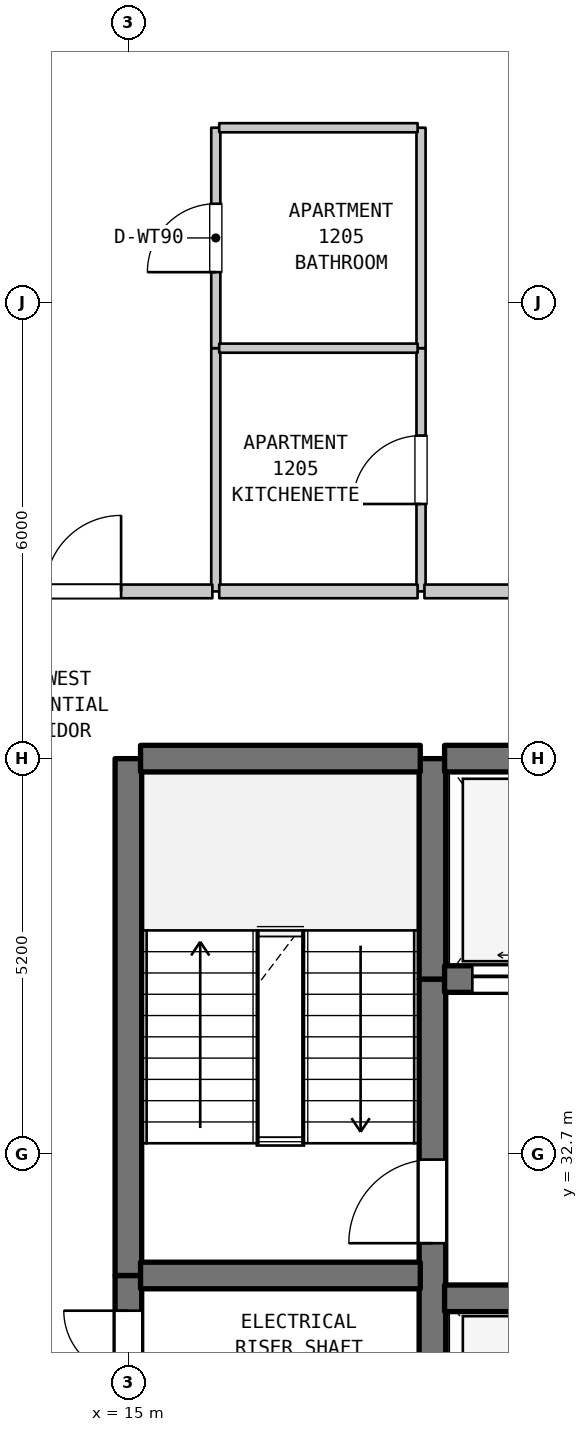
"""IFC4 building model, lengths in metres.
Left out: names, types, materials, properties, quantities, classifications, styles, units other than length and angle.
Written with IfcOpenShell. Run it as: python <this file> out.ifc"""

import sys

from ifc_helpers import new_model, si_unit, direction, frame, frame_2d, origin, place, context, subcontext, project, spatial, rectangle, extrude, element, fill, save


model = new_model("IFC4")
c1 = context("Model", 3, precision=1e-05, world=origin(), true_north=direction((0.0, 1.0)))
c2 = subcontext(c1, "Body", "Model", "MODEL_VIEW")
j1 = project(units=[si_unit("LENGTHUNIT", "METRE"), si_unit("PLANEANGLEUNIT", "RADIAN")], contexts=[c1])
p1 = place(None, origin())
s1 = spatial("IfcSite", under=j1, at=p1, CompositionType="ELEMENT")
p2 = place(p1, origin())
s2 = spatial("IfcBuilding", under=s1, at=p2, CompositionType="ELEMENT")
p3 = place(p2, frame((0.0, 0.0, 53.6)))
s3 = spatial("IfcBuildingStorey", under=s2, at=p3, CompositionType="ELEMENT", Elevation=53.6)
p4 = place(p3, frame((15.0, 29.5, 0.0), z_axis=(0.0, 0.0, 1.0), x_axis=(0.0, 1.0, 0.0)))
e1 = element("IfcWall", 1, at=p4, inside=s3, PredefinedType="SHEAR", context=c2, shape_type="SweptSolid", body=[
    extrude(rectangle(XDim=1.6, YDim=0.35, at=frame_2d((0.8, 0.0))), origin(), (0.0, 0.0, 1.0), 3.385),
])
p5 = place(p4, frame((0.287, 0.0, 0.0)))
e2 = element("IfcOpeningElement", 2, at=p5, cuts=e1, PredefinedType="OPENING", context=c2, shape_type="SweptSolid", body=[
    extrude(rectangle(XDim=0.85, YDim=2.1, at=frame_2d((0.425, 1.05))), frame((0.0, 0.185, 0.0), z_axis=(0.0, -1.0, 0.0), x_axis=(1.0, 0.0, 0.0)), (0.0, 0.0, 1.0), 0.37),
])
p6 = place(p3, frame((15.0, 31.1, 0.0), z_axis=(0.0, 0.0, 1.0), x_axis=(0.0, 1.0, 0.0)))
e3 = element("IfcWall", 3, at=p6, inside=s3, PredefinedType="SHEAR", context=c2, shape_type="SweptSolid", body=[
    extrude(rectangle(XDim=6.8, YDim=0.35, at=frame_2d((3.4, 0.0))), origin(), (0.0, 0.0, 1.0), 3.385),
])
p7 = place(p3, frame((16.15, 40.1, 0.0), z_axis=(0.0, 0.0, 1.0), x_axis=(0.0, 1.0, 0.0)))
e4 = element("IfcWall", 4, at=p7, inside=s3, PredefinedType="PARTITIONING", context=c2, shape_type="SweptSolid", body=[
    extrude(rectangle(XDim=3.2, YDim=0.12, at=frame_2d((1.6, 0.0))), origin(), (0.0, 0.0, 1.0), 3.385),
])
p8 = place(p3, frame((16.15, 43.3, 0.0), z_axis=(0.0, 0.0, 1.0), x_axis=(0.0, 1.0, 0.0)))
e5 = element("IfcWall", 5, at=p8, inside=s3, PredefinedType="PARTITIONING", context=c2, shape_type="SweptSolid", body=[
    extrude(rectangle(XDim=2.9, YDim=0.12, at=frame_2d((1.45, 0.0))), origin(), (0.0, 0.0, 1.0), 3.385),
])
p9 = place(p8, frame((1.0, 0.0, 0.0)))
e6 = element("IfcOpeningElement", 6, at=p9, cuts=e5, PredefinedType="OPENING", context=c2, shape_type="SweptSolid", body=[
    extrude(rectangle(XDim=0.9, YDim=2.1, at=frame_2d((0.45, 1.05))), frame((0.0, 0.07, 0.0), z_axis=(0.0, -1.0, 0.0), x_axis=(1.0, 0.0, 0.0)), (0.0, 0.0, 1.0), 0.14),
])
p10 = place(p3, frame((18.85, 40.1, 0.0), z_axis=(0.0, 0.0, 1.0), x_axis=(0.0, 1.0, 0.0)))
e7 = element("IfcWall", 7, at=p10, inside=s3, PredefinedType="PARTITIONING", context=c2, shape_type="SweptSolid", body=[
    extrude(rectangle(XDim=3.2, YDim=0.12, at=frame_2d((1.6, 0.0))), origin(), (0.0, 0.0, 1.0), 3.385),
])
p11 = place(p10, frame((1.15, 0.0, 0.0)))
e8 = element("IfcOpeningElement", 8, at=p11, cuts=e7, PredefinedType="OPENING", context=c2, shape_type="SweptSolid", body=[
    extrude(rectangle(XDim=0.9, YDim=2.15, at=frame_2d((0.45, 1.075))), frame((0.0, 0.07, 0.0), z_axis=(0.0, -1.0, 0.0), x_axis=(1.0, 0.0, 0.0)), (0.0, 0.0, 1.0), 0.14),
])
p12 = place(p3, frame((18.85, 43.3, 0.0), z_axis=(0.0, 0.0, 1.0), x_axis=(0.0, 1.0, 0.0)))
e9 = element("IfcWall", 9, at=p12, inside=s3, PredefinedType="PARTITIONING", context=c2, shape_type="SweptSolid", body=[
    extrude(rectangle(XDim=2.9, YDim=0.12, at=frame_2d((1.45, 0.0))), origin(), (0.0, 0.0, 1.0), 3.385),
])
p13 = place(p3, frame((19.0, 29.5, 0.0), z_axis=(0.0, 0.0, 1.0), x_axis=(0.0, 1.0, 0.0)))
e10 = element("IfcWall", 10, at=p13, inside=s3, PredefinedType="SHEAR", context=c2, shape_type="SweptSolid", body=[
    extrude(rectangle(XDim=5.5, YDim=0.35, at=frame_2d((2.75, 0.0))), origin(), (0.0, 0.0, 1.0), 3.385),
])
p14 = place(p13, frame((2.025, 0.0, 0.0)))
e11 = element("IfcOpeningElement", 11, at=p14, cuts=e10, PredefinedType="OPENING", context=c2, shape_type="SweptSolid", body=[
    extrude(rectangle(XDim=1.1, YDim=2.15, at=frame_2d((0.55, 1.075))), frame((0.0, 0.185, 0.0), z_axis=(0.0, -1.0, 0.0), x_axis=(1.0, 0.0, 0.0)), (0.0, 0.0, 1.0), 0.37),
])
p15 = place(p3, frame((19.0, 35.0, 0.0), z_axis=(0.0, 0.0, 1.0), x_axis=(0.0, 1.0, 0.0)))
e12 = element("IfcWall", 12, at=p15, inside=s3, PredefinedType="SHEAR", context=c2, shape_type="SweptSolid", body=[
    extrude(rectangle(XDim=2.9, YDim=0.35, at=frame_2d((1.45, 0.0))), origin(), (0.0, 0.0, 1.0), 3.385),
])
p16 = place(p3, frame((19.16, 30.8, 0.0), z_axis=(0.0, 0.0, 1.0), x_axis=(1.0, 0.0, 0.0)))
e13 = element("IfcWall", 13, at=p16, inside=s3, PredefinedType="SHEAR", context=c2, shape_type="SweptSolid", body=[
    extrude(rectangle(XDim=4.48, YDim=0.35, at=frame_2d((2.24, 0.0))), origin(), (0.0, 0.0, 1.0), 3.385),
])
p17 = place(p3, frame((15.16, 31.1, 0.0), z_axis=(0.0, 0.0, 1.0), x_axis=(1.0, 0.0, 0.0)))
e14 = element("IfcWall", 14, at=p17, inside=s3, PredefinedType="SHEAR", context=c2, shape_type="SweptSolid", body=[
    extrude(rectangle(XDim=3.68, YDim=0.35, at=frame_2d((1.84, 0.0))), origin(), (0.0, 0.0, 1.0), 3.385),
])
p18 = place(p3, frame((19.16, 35.0, 0.0), z_axis=(0.0, 0.0, 1.0), x_axis=(1.0, 0.0, 0.0)))
e15 = element("IfcWall", 15, at=p18, inside=s3, PredefinedType="SHEAR", context=c2, shape_type="SweptSolid", body=[
    extrude(rectangle(XDim=11.48, YDim=0.35, at=frame_2d((5.74, 0.0))), origin(), (0.0, 0.0, 1.0), 3.385),
])
p19 = place(p18, frame((0.365, 0.0, 0.0)))
e16 = element("IfcOpeningElement", 16, at=p19, cuts=e15, PredefinedType="OPENING", context=c2, shape_type="SweptSolid", body=[
    extrude(rectangle(XDim=1.35, YDim=2.2, at=frame_2d((0.675, 1.1))), frame((0.0, 0.185, 0.0), z_axis=(0.0, -1.0, 0.0), x_axis=(1.0, 0.0, 0.0)), (0.0, 0.0, 1.0), 0.37),
])
p20 = place(p18, frame((2.765, 0.0, 0.0)))
e17 = element("IfcOpeningElement", 17, at=p20, cuts=e15, PredefinedType="OPENING", context=c2, shape_type="SweptSolid", body=[
    extrude(rectangle(XDim=1.35, YDim=2.2, at=frame_2d((0.675, 1.1))), frame((0.0, 0.185, 0.0), z_axis=(0.0, -1.0, 0.0), x_axis=(1.0, 0.0, 0.0)), (0.0, 0.0, 1.0), 0.37),
])
p21 = place(p18, frame((4.915, 0.0, 0.0)))
e18 = element("IfcOpeningElement", 18, at=p21, cuts=e15, PredefinedType="OPENING", context=c2, shape_type="SweptSolid", body=[
    extrude(rectangle(XDim=1.2, YDim=2.2, at=frame_2d((0.6, 1.1))), frame((0.0, 0.185, 0.0), z_axis=(0.0, -1.0, 0.0), x_axis=(1.0, 0.0, 0.0)), (0.0, 0.0, 1.0), 0.37),
])
p22 = place(p18, frame((6.665, 0.0, 0.0)))
e19 = element("IfcOpeningElement", 19, at=p22, cuts=e15, PredefinedType="OPENING", context=c2, shape_type="SweptSolid", body=[
    extrude(rectangle(XDim=1.2, YDim=2.2, at=frame_2d((0.6, 1.1))), frame((0.0, 0.185, 0.0), z_axis=(0.0, -1.0, 0.0), x_axis=(1.0, 0.0, 0.0)), (0.0, 0.0, 1.0), 0.37),
])
p23 = place(p18, frame((8.415, 0.0, 0.0)))
e20 = element("IfcOpeningElement", 20, at=p23, cuts=e15, PredefinedType="OPENING", context=c2, shape_type="SweptSolid", body=[
    extrude(rectangle(XDim=1.2, YDim=2.2, at=frame_2d((0.6, 1.1))), frame((0.0, 0.185, 0.0), z_axis=(0.0, -1.0, 0.0), x_axis=(1.0, 0.0, 0.0)), (0.0, 0.0, 1.0), 0.37),
])
p24 = place(p18, frame((10.16, 0.0, 0.0)))
e21 = element("IfcOpeningElement", 21, at=p24, cuts=e15, PredefinedType="OPENING", context=c2, shape_type="SweptSolid", body=[
    extrude(rectangle(XDim=1.2, YDim=2.2, at=frame_2d((0.6, 1.1))), frame((0.0, 0.185, 0.0), z_axis=(0.0, -1.0, 0.0), x_axis=(1.0, 0.0, 0.0)), (0.0, 0.0, 1.0), 0.37),
])
p25 = place(p3, frame((15.16, 37.9, 0.0), z_axis=(0.0, 0.0, 1.0), x_axis=(1.0, 0.0, 0.0)))
e22 = element("IfcWall", 22, at=p25, inside=s3, PredefinedType="SHEAR", context=c2, shape_type="SweptSolid", body=[
    extrude(rectangle(XDim=3.68, YDim=0.35, at=frame_2d((1.84, 0.0))), origin(), (0.0, 0.0, 1.0), 3.385),
])
p26 = place(p3, frame((19.16, 37.9, 0.0), z_axis=(0.0, 0.0, 1.0), x_axis=(1.0, 0.0, 0.0)))
e23 = element("IfcWall", 23, at=p26, inside=s3, PredefinedType="SHEAR", context=c2, shape_type="SweptSolid", body=[
    extrude(rectangle(XDim=11.48, YDim=0.35, at=frame_2d((5.74, 0.0))), origin(), (0.0, 0.0, 1.0), 3.385),
])
p27 = place(p3, frame((12.875, 40.1, 0.0), z_axis=(0.0, 0.0, 1.0), x_axis=(1.0, 0.0, 0.0)))
e24 = element("IfcWall", 24, at=p27, inside=s3, PredefinedType="STANDARD", context=c2, shape_type="SweptSolid", body=[
    extrude(rectangle(XDim=3.23, YDim=0.18, at=frame_2d((1.615, 0.0))), origin(), (0.0, 0.0, 1.0), 3.385),
])
p28 = place(p27, frame((1.029, 0.0, 0.0)))
e25 = element("IfcOpeningElement", 25, at=p28, cuts=e24, PredefinedType="OPENING", context=c2, shape_type="SweptSolid", body=[
    extrude(rectangle(XDim=1.0, YDim=2.15, at=frame_2d((0.5, 1.075))), frame((0.0, 0.1, 0.0), z_axis=(0.0, -1.0, 0.0), x_axis=(1.0, 0.0, 0.0)), (0.0, 0.0, 1.0), 0.2),
])
p29 = place(p3, frame((16.195, 40.1, 0.0), z_axis=(0.0, 0.0, 1.0), x_axis=(1.0, 0.0, 0.0)))
e26 = element("IfcWall", 26, at=p29, inside=s3, PredefinedType="STANDARD", context=c2, shape_type="SweptSolid", body=[
    extrude(rectangle(XDim=2.61, YDim=0.18, at=frame_2d((1.305, 0.0))), origin(), (0.0, 0.0, 1.0), 3.385),
])
p30 = place(p3, frame((18.895, 40.1, 0.0), z_axis=(0.0, 0.0, 1.0), x_axis=(1.0, 0.0, 0.0)))
e27 = element("IfcWall", 27, at=p30, inside=s3, PredefinedType="STANDARD", context=c2, shape_type="SweptSolid", body=[
    extrude(rectangle(XDim=2.41, YDim=0.18, at=frame_2d((1.205, 0.0))), origin(), (0.0, 0.0, 1.0), 3.385),
])
for number, where, z_axis, x_axis in (
    (28, (16.195, 43.3, 0.0), (0.0, 0.0, 1.0), (1.0, 0.0, 0.0)),
    (29, (16.195, 46.2, 0.0), (0.0, 0.0, 1.0), (1.0, 0.0, 0.0)),
):
    element("IfcWall", number, at=place(p3, frame(where, z_axis=z_axis, x_axis=x_axis)), inside=s3, PredefinedType="PARTITIONING", context=c2, shape_type="SweptSolid", body=[
        extrude(rectangle(XDim=2.61, YDim=0.12, at=frame_2d((1.305, 0.0))), origin(), (0.0, 0.0, 1.0), 3.385),
    ])
p31 = place(p5, origin())
e30 = element("IfcDoor", 30, at=p31, inside=s3, OperationType="SINGLE_SWING_RIGHT", PredefinedType="DOOR", context=c2, shape_type="SweptSolid", body=[
    extrude(rectangle(XDim=0.85, YDim=2.1, at=frame_2d((0.425, 1.05))), frame((0.0, 0.025, 0.0), z_axis=(0.0, -1.0, 0.0), x_axis=(1.0, 0.0, 0.0)), (0.0, 0.0, 1.0), 0.05),
])
fill(e2, e30)
p32 = place(p9, origin())
e31 = element("IfcDoor", 31, at=p32, inside=s3, OperationType="SINGLE_SWING_LEFT", PredefinedType="DOOR", context=c2, shape_type="SweptSolid", body=[
    extrude(rectangle(XDim=0.9, YDim=2.1, at=frame_2d((0.45, 1.05))), frame((0.0, 0.025, 0.0), z_axis=(0.0, -1.0, 0.0), x_axis=(1.0, 0.0, 0.0)), (0.0, 0.0, 1.0), 0.05),
])
fill(e6, e31)
p33 = place(p11, origin())
e32 = element("IfcDoor", 32, at=p33, inside=s3, OperationType="SINGLE_SWING_LEFT", PredefinedType="DOOR", context=c2, shape_type="SweptSolid", body=[
    extrude(rectangle(XDim=0.9, YDim=2.15, at=frame_2d((0.45, 1.075))), frame((0.0, 0.025, 0.0), z_axis=(0.0, -1.0, 0.0), x_axis=(1.0, 0.0, 0.0)), (0.0, 0.0, 1.0), 0.05),
])
fill(e8, e32)
p34 = place(p14, origin())
e33 = element("IfcDoor", 33, at=p34, inside=s3, OperationType="SINGLE_SWING_LEFT", PredefinedType="DOOR", context=c2, shape_type="SweptSolid", body=[
    extrude(rectangle(XDim=1.1, YDim=2.15, at=frame_2d((0.55, 1.075))), frame((0.0, 0.025, 0.0), z_axis=(0.0, -1.0, 0.0), x_axis=(1.0, 0.0, 0.0)), (0.0, 0.0, 1.0), 0.05),
])
fill(e11, e33)
p35 = place(p19, origin())
e34 = element("IfcDoor", 34, at=p35, inside=s3, OperationType="DOUBLE_DOOR_SLIDING", PredefinedType="DOOR", context=c2, shape_type="SweptSolid", body=[
    extrude(rectangle(XDim=1.35, YDim=2.2, at=frame_2d((0.675, 1.1))), frame((0.0, 0.025, 0.0), z_axis=(0.0, -1.0, 0.0), x_axis=(1.0, 0.0, 0.0)), (0.0, 0.0, 1.0), 0.05),
])
fill(e16, e34)
p36 = place(p28, origin())
e35 = element("IfcDoor", 35, at=p36, inside=s3, OperationType="SINGLE_SWING_RIGHT", PredefinedType="DOOR", context=c2, shape_type="SweptSolid", body=[
    extrude(rectangle(XDim=1.0, YDim=2.15, at=frame_2d((0.5, 1.075))), frame((0.0, 0.025, 0.0), z_axis=(0.0, -1.0, 0.0), x_axis=(1.0, 0.0, 0.0)), (0.0, 0.0, 1.0), 0.05),
])
fill(e25, e35)
save(model, sys.argv[1])
